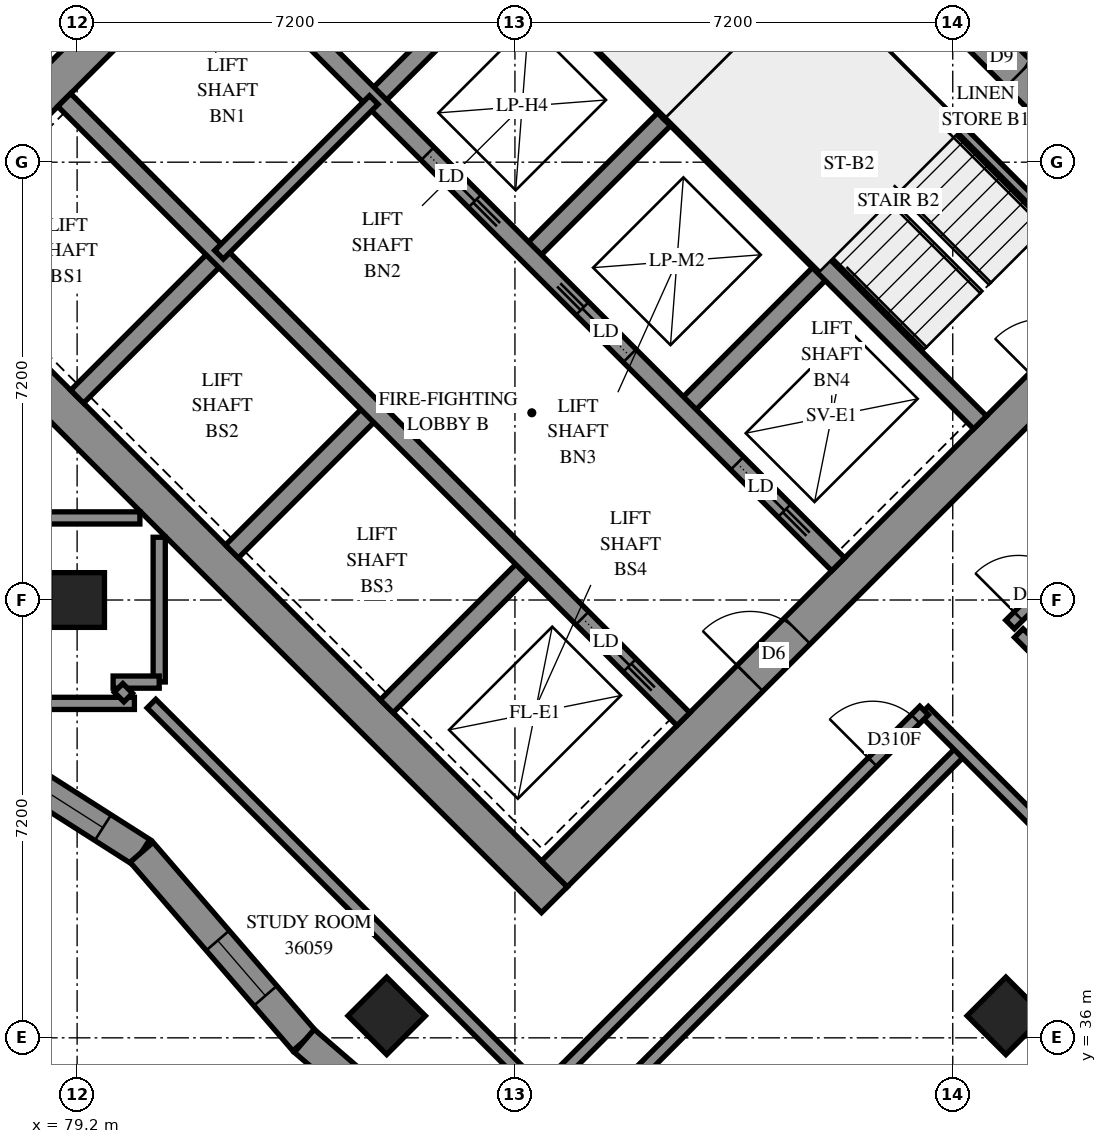
"""IFC4 building model, lengths in metres.
Left out: names, types, materials, properties, quantities, classifications, styles, units other than length and angle.
Written with IfcOpenShell. Run it as: python <this file> out.ifc"""

import sys

from ifc_helpers import new_model, si_unit, direction, frame, frame_2d, origin, origin_2d, place, context, subcontext, project, spatial, polyline, rectangle, outline, extrude, element, fill, save


model = new_model("IFC4")
c1 = context("Model", 3, precision=1e-05, world=origin(), true_north=direction((0.0, 1.0)))
c2 = subcontext(c1, "Body", "Model", "MODEL_VIEW")
j1 = project(units=[si_unit("LENGTHUNIT", "METRE"), si_unit("PLANEANGLEUNIT", "RADIAN")], contexts=[c1])
p1 = place(None, origin())
s1 = spatial("IfcSite", under=j1, at=p1, CompositionType="ELEMENT")
p2 = place(p1, origin())
s2 = spatial("IfcBuilding", under=s1, at=p2, CompositionType="ELEMENT")
p3 = place(p2, frame((0.0, 0.0, 135.4)))
s3 = spatial("IfcBuildingStorey", under=s2, at=p3, CompositionType="ELEMENT", Elevation=135.4)
for number, where, z_axis, x_axis in (
    (1, (79.2, 43.2, 0.0), (0.0, 0.0, 1.0), (1.0, 0.0, 0.0)),
    (2, (84.291, 36.362, 0.0), (0.0, 0.0, 1.0), (0.707, -0.707, 0.0)),
    (3, (94.474, 36.362, 0.0), (0.0, 0.0, 1.0), (0.707, -0.707, 0.0)),
):
    element("IfcColumn", number, at=place(p3, frame(where, z_axis=z_axis, x_axis=x_axis)), inside=s3, PredefinedType="COLUMN", context=c2, shape_type="SweptSolid", body=[
        extrude(rectangle(XDim=0.9, YDim=0.9, at=origin_2d()), origin(), (0.0, 0.0, 1.0), 3.1),
    ])
p4 = place(p3, frame((76.018, 49.302, -0.3), z_axis=(0.0, 0.0, 1.0), x_axis=(0.7071067812, -0.7071067812, 0.0)))
e4 = element("IfcWall", 4, at=p4, inside=s3, PredefinedType="SHEAR", context=c2, shape_type="SweptSolid", body=[
    extrude(rectangle(XDim=15.6, YDim=0.6, at=frame_2d((7.8, 0.0))), origin(), (0.0, 0.0, 1.0), 2.7),
])
p5 = place(p3, frame((86.625, 59.908, -0.3), z_axis=(0.0, 0.0, 1.0), x_axis=(0.7071067812, -0.7071067812, 0.0)))
e5 = element("IfcWall", 5, at=p5, inside=s3, PredefinedType="SHEAR", context=c2, shape_type="SweptSolid", body=[
    extrude(rectangle(XDim=15.6, YDim=0.6, at=frame_2d((7.8, 0.0))), origin(), (0.0, 0.0, 1.0), 2.7),
])
p6 = place(p5, frame((10.6, 0.0, 0.3)))
e6 = element("IfcOpeningElement", 6, at=p6, cuts=e5, PredefinedType="OPENING", context=c2, shape_type="SweptSolid", body=[
    extrude(rectangle(XDim=0.8, YDim=2.1, at=frame_2d((0.4, 1.05))), frame((0.0, 0.31, 0.0), z_axis=(0.0, -1.0, 0.0), x_axis=(1.0, 0.0, 0.0)), (0.0, 0.0, 1.0), 0.62),
])
p7 = place(p3, frame((76.442, 49.302, -0.3), z_axis=(0.0, 0.0, 1.0), x_axis=(0.7071067812, 0.7071067812, 0.0)))
e7 = element("IfcWall", 7, at=p7, inside=s3, PredefinedType="SHEAR", context=c2, shape_type="SweptSolid", body=[
    extrude(rectangle(XDim=14.4, YDim=0.6, at=frame_2d((7.2, 0.0))), origin(), (0.0, 0.0, 1.0), 2.7),
])
p8 = place(p7, frame((4.55, 0.0, 0.3)))
e8 = element("IfcOpeningElement", 8, at=p8, cuts=e7, PredefinedType="OPENING", context=c2, shape_type="SweptSolid", body=[
    extrude(rectangle(XDim=1.1, YDim=2.1, at=frame_2d((0.55, 1.05))), frame((0.0, 0.31, 0.0), z_axis=(0.0, -1.0, 0.0), x_axis=(1.0, 0.0, 0.0)), (0.0, 0.0, 1.0), 0.62),
])
p9 = place(p7, frame((11.35, 0.0, 0.3)))
e9 = element("IfcOpeningElement", 9, at=p9, cuts=e7, PredefinedType="OPENING", context=c2, shape_type="SweptSolid", body=[
    extrude(rectangle(XDim=1.1, YDim=2.1, at=frame_2d((0.55, 1.05))), frame((0.0, 0.31, 0.0), z_axis=(0.0, -1.0, 0.0), x_axis=(1.0, 0.0, 0.0)), (0.0, 0.0, 1.0), 0.62),
])
p10 = place(p3, frame((87.049, 38.695, -0.3), z_axis=(0.0, 0.0, 1.0), x_axis=(0.7071067812, 0.7071067812, 0.0)))
e10 = element("IfcWall", 10, at=p10, inside=s3, PredefinedType="SHEAR", context=c2, shape_type="SweptSolid", body=[
    extrude(rectangle(XDim=14.4, YDim=0.6, at=frame_2d((7.2, 0.0))), origin(), (0.0, 0.0, 1.0), 2.7),
])
p11 = place(p10, frame((4.55, 0.0, 0.3)))
e11 = element("IfcOpeningElement", 11, at=p11, cuts=e10, PredefinedType="OPENING", context=c2, shape_type="SweptSolid", body=[
    extrude(rectangle(XDim=1.1, YDim=2.1, at=frame_2d((0.55, 1.05))), frame((0.0, 0.31, 0.0), z_axis=(0.0, -1.0, 0.0), x_axis=(1.0, 0.0, 0.0)), (0.0, 0.0, 1.0), 0.62),
])
p12 = place(p10, frame((11.35, 0.0, 0.3)))
e12 = element("IfcOpeningElement", 12, at=p12, cuts=e10, PredefinedType="OPENING", context=c2, shape_type="SweptSolid", body=[
    extrude(rectangle(XDim=1.1, YDim=2.1, at=frame_2d((0.55, 1.05))), frame((0.0, 0.31, 0.0), z_axis=(0.0, -1.0, 0.0), x_axis=(1.0, 0.0, 0.0)), (0.0, 0.0, 1.0), 0.62),
])
for number, where, z_axis, x_axis in (
    (13, (79.2, 46.544, 0.0), (0.0, 0.0, 1.0), (0.707, 0.707, 0.0)),
    (14, (84.079, 51.423, 0.0), (0.0, 0.0, 1.0), (0.707, 0.707, 0.0)),
):
    element("IfcWall", number, at=place(p3, frame(where, z_axis=z_axis, x_axis=x_axis)), inside=s3, PredefinedType="SOLIDWALL", context=c2, shape_type="SweptSolid", body=[
        extrude(rectangle(XDim=3.3, YDim=0.3, at=frame_2d((1.65, 0.0))), origin(), (0.0, 0.0, 1.0), 3.1),
    ])
p13 = place(p3, frame((81.746, 43.999, 0.0), z_axis=(0.0, 0.0, 1.0), x_axis=(0.7071067812, 0.7071067812, 0.0)))
e15 = element("IfcWall", 15, at=p13, inside=s3, PredefinedType="SOLIDWALL", context=c2, shape_type="SweptSolid", body=[
    extrude(rectangle(XDim=3.3, YDim=0.3, at=frame_2d((1.65, 0.0))), origin(), (0.0, 0.0, 1.0), 3.1),
])
p14 = place(p3, frame((86.625, 48.878, 0.0), z_axis=(0.0, 0.0, 1.0), x_axis=(0.7071067812, 0.7071067812, 0.0)))
e16 = element("IfcWall", 16, at=p14, inside=s3, PredefinedType="SOLIDWALL", context=c2, shape_type="SweptSolid", body=[
    extrude(rectangle(XDim=3.3, YDim=0.3, at=frame_2d((1.65, 0.0))), origin(), (0.0, 0.0, 1.0), 3.1),
])
p15 = place(p3, frame((84.291, 41.453, 0.0), z_axis=(0.0, 0.0, 1.0), x_axis=(0.7071067812, 0.7071067812, 0.0)))
e17 = element("IfcWall", 17, at=p15, inside=s3, PredefinedType="SOLIDWALL", context=c2, shape_type="SweptSolid", body=[
    extrude(rectangle(XDim=3.3, YDim=0.3, at=frame_2d((1.65, 0.0))), origin(), (0.0, 0.0, 1.0), 3.1),
])
p16 = place(p3, frame((89.17, 46.332, 0.0), z_axis=(0.0, 0.0, 1.0), x_axis=(0.7071067812, 0.7071067812, 0.0)))
e18 = element("IfcWall", 18, at=p16, inside=s3, PredefinedType="SOLIDWALL", context=c2, shape_type="SweptSolid", body=[
    extrude(rectangle(XDim=3.3, YDim=0.3, at=frame_2d((1.65, 0.0))), origin(), (0.0, 0.0, 1.0), 3.1),
])
p17 = place(p3, frame((78.988, 51.423, 0.0), z_axis=(0.0, 0.0, 1.0), x_axis=(0.7071067812, -0.7071067812, 0.0)))
e19 = element("IfcWall", 19, at=p17, inside=s3, PredefinedType="SOLIDWALL", context=c2, shape_type="SweptSolid", body=[
    extrude(rectangle(XDim=14.4, YDim=0.3, at=frame_2d((7.2, 0.0))), origin(), (0.0, 0.0, 1.0), 3.1),
])
p18 = place(p17, frame((12.05, 0.0, 0.0)))
e20 = element("IfcOpeningElement", 20, at=p18, cuts=e19, PredefinedType="OPENING", context=c2, shape_type="SweptSolid", body=[
    extrude(rectangle(XDim=1.1, YDim=2.1, at=frame_2d((0.55, 1.05))), frame((0.0, 0.16, 0.0), z_axis=(0.0, -1.0, 0.0), x_axis=(1.0, 0.0, 0.0)), (0.0, 0.0, 1.0), 0.32),
])
p19 = place(p3, frame((81.534, 53.969, 0.0), z_axis=(0.0, 0.0, 1.0), x_axis=(0.707103309, -0.7071102534, 0.0)))
e21 = element("IfcWall", 21, at=p19, inside=s3, PredefinedType="SOLIDWALL", context=c2, shape_type="SweptSolid", body=[
    extrude(rectangle(XDim=14.4, YDim=0.3, at=frame_2d((7.2, 0.0))), origin(), (0.0, 0.0, 1.0), 3.1),
])
p20 = place(p19, frame((1.25, 0.0, 0.0)))
e22 = element("IfcOpeningElement", 22, at=p20, cuts=e21, PredefinedType="OPENING", context=c2, shape_type="SweptSolid", body=[
    extrude(rectangle(XDim=1.1, YDim=2.1, at=frame_2d((0.55, 1.05))), frame((0.0, 0.16, 0.0), z_axis=(0.0, -1.0, 0.0), x_axis=(1.0, 0.0, 0.0)), (0.0, 0.0, 1.0), 0.32),
])
p21 = place(p19, frame((4.85, 0.0, 0.0)))
e23 = element("IfcOpeningElement", 23, at=p21, cuts=e21, PredefinedType="OPENING", context=c2, shape_type="SweptSolid", body=[
    extrude(rectangle(XDim=1.1, YDim=2.1, at=frame_2d((0.55, 1.05))), frame((0.0, 0.16, 0.0), z_axis=(0.0, -1.0, 0.0), x_axis=(1.0, 0.0, 0.0)), (0.0, 0.0, 1.0), 0.32),
])
p22 = place(p19, frame((8.45, 0.0, 0.0)))
e24 = element("IfcOpeningElement", 24, at=p22, cuts=e21, PredefinedType="OPENING", context=c2, shape_type="SweptSolid", body=[
    extrude(rectangle(XDim=1.1, YDim=2.1, at=frame_2d((0.55, 1.05))), frame((0.0, 0.16, 0.0), z_axis=(0.0, -1.0, 0.0), x_axis=(1.0, 0.0, 0.0)), (0.0, 0.0, 1.0), 0.32),
])
p23 = place(p19, frame((12.05, 0.0, 0.0)))
e25 = element("IfcOpeningElement", 25, at=p23, cuts=e21, PredefinedType="OPENING", context=c2, shape_type="SweptSolid", body=[
    extrude(rectangle(XDim=1.1, YDim=2.1, at=frame_2d((0.55, 1.05))), frame((0.0, 0.16, 0.0), z_axis=(0.0, -1.0, 0.0), x_axis=(1.0, 0.0, 0.0)), (0.0, 0.0, 1.0), 0.32),
])
for number, where, z_axis, x_axis in (
    (26, (83.867, 56.302, 0.0), (0.0, 0.0, 1.0), (0.707, -0.707, 0.0)),
    (27, (88.958, 51.211, 0.0), (0.0, 0.0, 1.0), (0.707, -0.707, 0.0)),
):
    element("IfcWall", number, at=place(p3, frame(where, z_axis=z_axis, x_axis=x_axis)), inside=s3, PredefinedType="SOLIDWALL", context=c2, shape_type="SweptSolid", body=[
        extrude(rectangle(XDim=7.2, YDim=0.3, at=frame_2d((3.6, 0.0))), origin(), (0.0, 0.0, 1.0), 3.1),
    ])
p24 = place(p3, frame((88.958, 51.211, 0.0), z_axis=(0.0, 0.0, 1.0), x_axis=(0.7071067812, 0.7071067812, 0.0)))
e28 = element("IfcWall", 28, at=p24, inside=s3, PredefinedType="SOLIDWALL", context=c2, shape_type="SweptSolid", body=[
    extrude(rectangle(XDim=4.2, YDim=0.3, at=frame_2d((2.1, 0.0))), origin(), (0.0, 0.0, 1.0), 3.1),
])
p25 = place(p3, frame((76.684, 41.332, 0.0), z_axis=(0.0, 0.0, 1.0), x_axis=(0.8431951323, -0.5376076347, 0.0)))
e29 = element("IfcWall", 29, at=p25, inside=s3, PredefinedType="SOLIDWALL", context=c2, shape_type="SweptSolid", body=[
    extrude(outline(polyline([(0.039, -0.25), (4.204, -0.25), (4.278, 0.25), (-0.039, 0.25), (0.039, -0.25)])), origin(), (0.0, 0.0, 1.0), 3.1),
])
p26 = place(p25, frame((0.917, 0.0, 0.45)))
e30 = element("IfcOpeningElement", 30, at=p26, cuts=e29, PredefinedType="OPENING", context=c2, shape_type="SweptSolid", body=[
    extrude(rectangle(XDim=1.2, YDim=2.5, at=frame_2d((0.6, 1.25))), frame((0.0, 0.26, 0.0), z_axis=(0.0, -1.0, 0.0), x_axis=(1.0, 0.0, 0.0)), (0.0, 0.0, 1.0), 0.52),
])
p27 = place(p25, frame((2.288, 0.0, 0.45)))
e31 = element("IfcOpeningElement", 31, at=p27, cuts=e29, PredefinedType="OPENING", context=c2, shape_type="SweptSolid", body=[
    extrude(rectangle(XDim=1.2, YDim=2.5, at=frame_2d((0.6, 1.25))), frame((0.0, 0.26, 0.0), z_axis=(0.0, -1.0, 0.0), x_axis=(1.0, 0.0, 0.0)), (0.0, 0.0, 1.0), 0.52),
])
p28 = place(p3, frame((80.26, 39.052, 0.0), z_axis=(0.0, 0.0, 1.0), x_axis=(0.6531786437, -0.7572038427, 0.0)))
e32 = element("IfcWall", 32, at=p28, inside=s3, PredefinedType="SOLIDWALL", context=c2, shape_type="SweptSolid", body=[
    extrude(outline(polyline([(0.037, -0.25), (4.114, -0.25), (4.078, 0.25), (-0.037, 0.25), (0.037, -0.25)])), origin(), (0.0, 0.0, 1.0), 3.1),
])
p29 = place(p28, frame((1.917, 0.0, 0.45)))
e33 = element("IfcOpeningElement", 33, at=p29, cuts=e32, PredefinedType="OPENING", context=c2, shape_type="SweptSolid", body=[
    extrude(rectangle(XDim=1.2, YDim=2.5, at=frame_2d((0.6, 1.25))), frame((0.0, 0.26, 0.0), z_axis=(0.0, -1.0, 0.0), x_axis=(1.0, 0.0, 0.0)), (0.0, 0.0, 1.0), 0.52),
])
p30 = place(p3, frame((82.936, 35.95, 0.0), z_axis=(0.0, 0.0, 1.0), x_axis=(0.7572154684, -0.6531651662, 0.0)))
e34 = element("IfcWall", 34, at=p30, inside=s3, PredefinedType="SOLIDWALL", context=c2, shape_type="SweptSolid", body=[
    extrude(outline(polyline([(-0.018, -0.25), (4.059, -0.25), (4.096, 0.25), (0.018, 0.25), (-0.018, -0.25)])), origin(), (0.0, 0.0, 1.0), 3.1),
])
p31 = place(p30, frame((0.873, 0.0, 0.45)))
e35 = element("IfcOpeningElement", 35, at=p31, cuts=e34, PredefinedType="OPENING", context=c2, shape_type="SweptSolid", body=[
    extrude(rectangle(XDim=2.8, YDim=2.5, at=frame_2d((1.4, 1.25))), frame((0.0, 0.26, 0.0), z_axis=(0.0, -1.0, 0.0), x_axis=(1.0, 0.0, 0.0)), (0.0, 0.0, 1.0), 0.52),
])
p32 = place(p3, frame((91.313, 53.354, 0.0), z_axis=(0.0, 0.0, 1.0), x_axis=(0.7071140275, -0.7070995348, 0.0)))
e36 = element("IfcWall", 36, at=p32, inside=s3, PredefinedType="PARTITIONING", context=c2, shape_type="SweptSolid", body=[
    extrude(rectangle(XDim=6.9, YDim=0.15, at=frame_2d((3.45, 0.0))), origin(), (0.0, 0.0, 1.0), 3.1),
])
p33 = place(p3, frame((81.534, 48.878, 0.0), z_axis=(0.0, 0.0, 1.0), x_axis=(0.707092892, 0.7071206701, 0.0)))
e37 = element("IfcWall", 37, at=p33, inside=s3, PredefinedType="PARTITIONING", context=c2, shape_type="SweptSolid", body=[
    extrude(rectangle(XDim=3.6, YDim=0.2, at=frame_2d((1.8, 0.0))), origin(), (0.0, 0.0, 1.0), 3.1),
])
p34 = place(p3, frame((86.332, 33.313, 0.0), z_axis=(0.0, 0.0, 1.0), x_axis=(0.7071020252, 0.7071115371, 0.0)))
e38 = element("IfcWall", 38, at=p34, inside=s3, PredefinedType="PARTITIONING", context=c2, shape_type="SweptSolid", body=[
    extrude(rectangle(XDim=10.513, YDim=0.2, at=frame_2d((5.257, 0.0))), origin(), (0.0, 0.0, 1.0), 3.1),
])
p35 = place(p3, frame((93.127, 41.379, 0.0), z_axis=(0.0, 0.0, 1.0), x_axis=(0.7071067812, -0.7071067812, 0.0)))
e39 = element("IfcWall", 39, at=p35, inside=s3, PredefinedType="PARTITIONING", context=c2, shape_type="SweptSolid", body=[
    extrude(rectangle(XDim=9.39, YDim=0.2, at=frame_2d((4.695, 0.0))), origin(), (0.0, 0.0, 1.0), 3.1),
])
p36 = place(p35, frame((3.2, 0.0, 0.0)))
e40 = element("IfcOpeningElement", 40, at=p36, cuts=e39, PredefinedType="OPENING", context=c2, shape_type="SweptSolid", body=[
    extrude(rectangle(XDim=0.9, YDim=2.1, at=frame_2d((0.45, 1.05))), frame((0.0, 0.11, 0.0), z_axis=(0.0, -1.0, 0.0), x_axis=(1.0, 0.0, 0.0)), (0.0, 0.0, 1.0), 0.22),
])
p37 = place(p3, frame((80.423, 41.497, 0.0), z_axis=(0.0, 0.0, 1.0), x_axis=(0.7071067812, -0.7071067812, 0.0)))
e41 = element("IfcWall", 41, at=p37, inside=s3, PredefinedType="PARTITIONING", context=c2, shape_type="SweptSolid", body=[
    extrude(rectangle(XDim=9.065, YDim=0.2, at=frame_2d((4.532, 0.0))), origin(), (0.0, 0.0, 1.0), 3.1),
])
p38 = place(p3, frame((94.543, 42.797, 0.0), z_axis=(0.0, 0.0, 1.0), x_axis=(0.7071067812, 0.7071067812, 0.0)))
e42 = element("IfcWall", 42, at=p38, inside=s3, PredefinedType="PARTITIONING", context=c2, shape_type="SweptSolid", body=[
    extrude(rectangle(XDim=8.901, YDim=0.2, at=frame_2d((4.45, 0.0))), origin(), (0.0, 0.0, 1.0), 3.1),
])
p39 = place(p38, frame((0.193, 0.0, 0.0)))
e43 = element("IfcOpeningElement", 43, at=p39, cuts=e42, PredefinedType="OPENING", context=c2, shape_type="SweptSolid", body=[
    extrude(rectangle(XDim=1.0, YDim=2.1, at=frame_2d((0.5, 1.05))), frame((0.0, 0.11, 0.0), z_axis=(0.0, -1.0, 0.0), x_axis=(1.0, 0.0, 0.0)), (0.0, 0.0, 1.0), 0.22),
])
p40 = place(p3, frame((86.837, 35.091, 0.0), z_axis=(0.0, 0.0, 1.0), x_axis=(0.7071067812, 0.7071067812, 0.0)))
e44 = element("IfcWall", 44, at=p40, inside=s3, PredefinedType="PARTITIONING", context=c2, shape_type="SweptSolid", body=[
    extrude(rectangle(XDim=8.898, YDim=0.2, at=frame_2d((4.449, 0.0))), origin(), (0.0, 0.0, 1.0), 3.1),
])
p41 = place(p40, frame((7.7, 0.0, 0.0)))
e45 = element("IfcOpeningElement", 45, at=p41, cuts=e44, PredefinedType="OPENING", context=c2, shape_type="SweptSolid", body=[
    extrude(rectangle(XDim=1.0, YDim=2.1, at=frame_2d((0.5, 1.05))), frame((0.0, 0.11, 0.0), z_axis=(0.0, -1.0, 0.0), x_axis=(1.0, 0.0, 0.0)), (0.0, 0.0, 1.0), 0.22),
])
p42 = place(p3, frame((77.502, 41.5, 0.0), z_axis=(0.0, 0.0, 1.0), x_axis=(1.0, 0.0, 0.0)))
e46 = element("IfcWall", 46, at=p42, inside=s3, PredefinedType="PARTITIONING", context=c2, shape_type="SweptSolid", body=[
    extrude(rectangle(XDim=2.64, YDim=0.2, at=frame_2d((1.32, 0.0))), origin(), (0.0, 0.0, 1.0), 3.1),
])
for number, where, z_axis, x_axis in (
    (47, (80.55, 41.852, 0.0), (0.0, 0.0, 1.0), (0.0, 1.0, 0.0)),
    (48, (77.852, 44.55, 0.0), (0.0, 0.0, 1.0), (1.0, 0.0, 0.0)),
):
    element("IfcWall", number, at=place(p3, frame(where, z_axis=z_axis, x_axis=x_axis)), inside=s3, PredefinedType="PARTITIONING", context=c2, shape_type="SweptSolid", body=[
        extrude(rectangle(XDim=2.38, YDim=0.2, at=frame_2d((1.19, 0.0))), origin(), (0.0, 0.0, 1.0), 3.1),
    ])
p43 = place(p3, frame((79.792, 41.85, 0.0), z_axis=(0.0, 0.0, 1.0), x_axis=(1.0, 0.0, 0.0)))
e49 = element("IfcWall", 49, at=p43, inside=s3, PredefinedType="PARTITIONING", context=c2, shape_type="SweptSolid", body=[
    extrude(rectangle(XDim=0.758, YDim=0.2, at=frame_2d((0.379, 0.0))), origin(), (0.0, 0.0, 1.0), 3.1),
])
p44 = place(p3, frame((94.686, 42.656, 0.0), z_axis=(0.0, 0.0, 1.0), x_axis=(0.7056768426, -0.7085338339, 0.0)))
e50 = element("IfcWall", 50, at=p44, inside=s3, PredefinedType="PARTITIONING", context=c2, shape_type="SweptSolid", body=[
    extrude(rectangle(XDim=0.7, YDim=0.2, at=frame_2d((0.35, 0.0))), origin(), (0.0, 0.0, 1.0), 3.1),
])
p45 = place(p3, frame((79.881, 41.755, 0.0), z_axis=(0.0, 0.0, 1.0), x_axis=(0.7071067812, -0.7071067812, 0.0)))
e51 = element("IfcWall", 51, at=p45, inside=s3, PredefinedType="PARTITIONING", context=c2, shape_type="SweptSolid", body=[
    extrude(rectangle(XDim=0.225, YDim=0.2, at=frame_2d((0.113, 0.0))), origin(), (0.0, 0.0, 1.0), 3.1),
])
p46 = place(p27, origin())
e52 = element("IfcWindow", 52, at=p46, inside=s3, PartitioningType="SINGLE_PANEL", PredefinedType="WINDOW", context=c2, shape_type="SweptSolid", body=[
    extrude(rectangle(XDim=1.2, YDim=2.5, at=frame_2d((0.6, 1.25))), frame((0.0, 0.18, 0.0), z_axis=(0.0, -1.0, 0.0), x_axis=(1.0, 0.0, 0.0)), (0.0, 0.0, 1.0), 0.06),
])
fill(e31, e52)
p47 = place(p29, origin())
e53 = element("IfcWindow", 53, at=p47, inside=s3, PartitioningType="SINGLE_PANEL", PredefinedType="WINDOW", context=c2, shape_type="SweptSolid", body=[
    extrude(rectangle(XDim=1.2, YDim=2.5, at=frame_2d((0.6, 1.25))), frame((0.0, 0.18, 0.0), z_axis=(0.0, -1.0, 0.0), x_axis=(1.0, 0.0, 0.0)), (0.0, 0.0, 1.0), 0.06),
])
fill(e33, e53)
p48 = place(p6, origin())
e54 = element("IfcDoor", 54, at=p48, inside=s3, OperationType="SINGLE_SWING_RIGHT", PredefinedType="DOOR", context=c2, shape_type="SweptSolid", body=[
    extrude(rectangle(XDim=0.8, YDim=2.1, at=frame_2d((0.4, 1.05))), frame((0.0, 0.025, 0.0), z_axis=(0.0, -1.0, 0.0), x_axis=(1.0, 0.0, 0.0)), (0.0, 0.0, 1.0), 0.05),
])
fill(e6, e54)
p49 = place(p11, origin())
e55 = element("IfcDoor", 55, at=p49, inside=s3, OperationType="DOUBLE_DOOR_SINGLE_SWING", PredefinedType="DOOR", context=c2, shape_type="SweptSolid", body=[
    extrude(rectangle(XDim=1.1, YDim=2.1, at=frame_2d((0.55, 1.05))), frame((0.0, 0.025, 0.0), z_axis=(0.0, -1.0, 0.0), x_axis=(1.0, 0.0, 0.0)), (0.0, 0.0, 1.0), 0.05),
])
fill(e11, e55)
p50 = place(p18, origin())
e56 = element("IfcDoor", 56, at=p50, inside=s3, OperationType="SLIDING_TO_RIGHT", PredefinedType="DOOR", context=c2, shape_type="SweptSolid", body=[
    extrude(rectangle(XDim=1.1, YDim=2.1, at=frame_2d((0.55, 1.05))), frame((0.0, 0.025, 0.0), z_axis=(0.0, -1.0, 0.0), x_axis=(1.0, 0.0, 0.0)), (0.0, 0.0, 1.0), 0.05),
])
fill(e20, e56)
p51 = place(p21, origin())
e57 = element("IfcDoor", 57, at=p51, inside=s3, OperationType="SLIDING_TO_RIGHT", PredefinedType="DOOR", context=c2, shape_type="SweptSolid", body=[
    extrude(rectangle(XDim=1.1, YDim=2.1, at=frame_2d((0.55, 1.05))), frame((0.0, 0.025, 0.0), z_axis=(0.0, -1.0, 0.0), x_axis=(1.0, 0.0, 0.0)), (0.0, 0.0, 1.0), 0.05),
])
fill(e23, e57)
p52 = place(p22, origin())
e58 = element("IfcDoor", 58, at=p52, inside=s3, OperationType="SLIDING_TO_LEFT", PredefinedType="DOOR", context=c2, shape_type="SweptSolid", body=[
    extrude(rectangle(XDim=1.1, YDim=2.1, at=frame_2d((0.55, 1.05))), frame((0.0, 0.025, 0.0), z_axis=(0.0, -1.0, 0.0), x_axis=(1.0, 0.0, 0.0)), (0.0, 0.0, 1.0), 0.05),
])
fill(e24, e58)
p53 = place(p23, origin())
e59 = element("IfcDoor", 59, at=p53, inside=s3, OperationType="SLIDING_TO_RIGHT", PredefinedType="DOOR", context=c2, shape_type="SweptSolid", body=[
    extrude(rectangle(XDim=1.1, YDim=2.1, at=frame_2d((0.55, 1.05))), frame((0.0, 0.025, 0.0), z_axis=(0.0, -1.0, 0.0), x_axis=(1.0, 0.0, 0.0)), (0.0, 0.0, 1.0), 0.05),
])
fill(e25, e59)
p54 = place(p39, origin())
e60 = element("IfcDoor", 60, at=p54, inside=s3, OperationType="SINGLE_SWING_LEFT", PredefinedType="DOOR", context=c2, shape_type="SweptSolid", body=[
    extrude(rectangle(XDim=1.0, YDim=2.1, at=frame_2d((0.5, 1.05))), frame((0.0, 0.025, 0.0), z_axis=(0.0, -1.0, 0.0), x_axis=(1.0, 0.0, 0.0)), (0.0, 0.0, 1.0), 0.05),
])
fill(e43, e60)
p55 = place(p41, origin())
e61 = element("IfcDoor", 61, at=p55, inside=s3, OperationType="SINGLE_SWING_LEFT", PredefinedType="DOOR", context=c2, shape_type="SweptSolid", body=[
    extrude(rectangle(XDim=1.0, YDim=2.1, at=frame_2d((0.5, 1.05))), frame((0.0, 0.025, 0.0), z_axis=(0.0, -1.0, 0.0), x_axis=(1.0, 0.0, 0.0)), (0.0, 0.0, 1.0), 0.05),
])
fill(e45, e61)
save(model, sys.argv[1])
